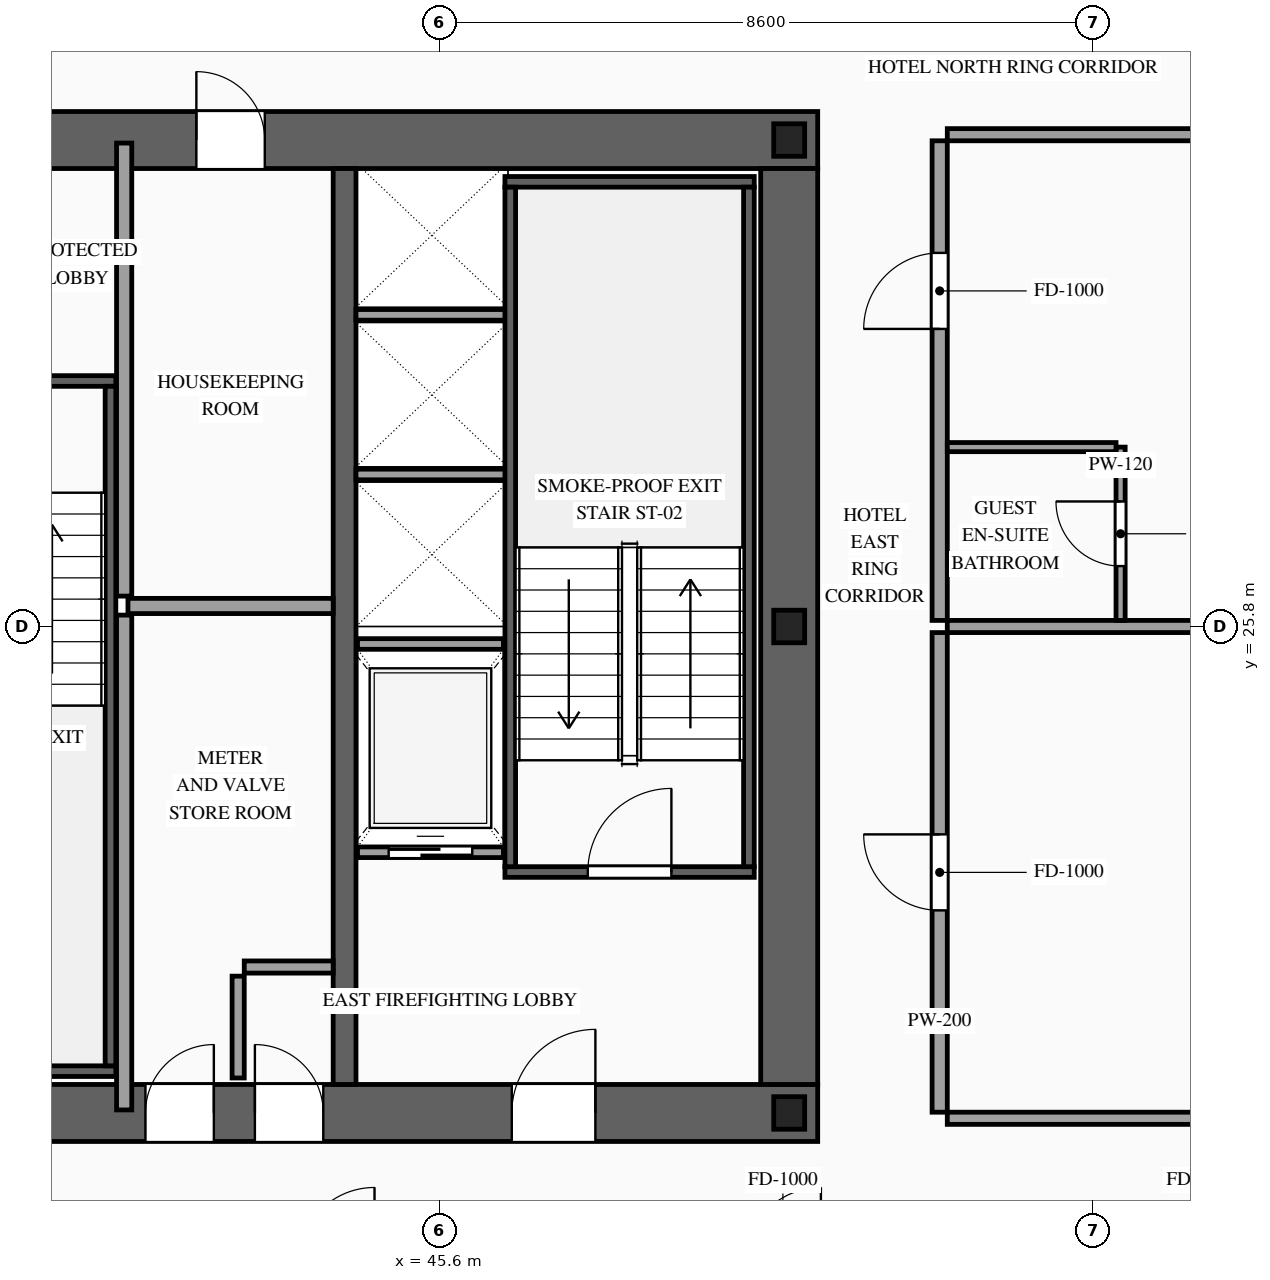
"""IFC4 building model, lengths in metres.
Left out: names, types, materials, properties, quantities, classifications, styles, units other than length and angle.
Written with IfcOpenShell. Run it as: python <this file> out.ifc"""

import sys

from ifc_helpers import new_model, si_unit, direction, frame, frame_2d, origin, origin_2d, place, context, subcontext, project, spatial, rectangle, i_section, extrude, source, transform, mapped, element, fill, save


model = new_model("IFC4")
c1 = context("Model", 3, precision=1e-05, world=origin(), true_north=direction((0.0, 1.0)))
c2 = subcontext(c1, "Body", "Model", "MODEL_VIEW")
j1 = project(units=[si_unit("LENGTHUNIT", "METRE"), si_unit("PLANEANGLEUNIT", "RADIAN")], contexts=[c1])
p1 = place(None, origin())
s1 = spatial("IfcSite", under=j1, at=p1, CompositionType="ELEMENT")
p2 = place(p1, origin())
s2 = spatial("IfcBuilding", under=s1, at=p2, CompositionType="ELEMENT")
p3 = place(p2, frame((0.0, 0.0, 97.4)))
s3 = spatial("IfcBuildingStorey", under=s2, at=p3, CompositionType="ELEMENT", Elevation=97.4)
p4 = place(p3, frame((23.425, 19.4, 0.0), z_axis=(0.0, 0.0, 1.0), x_axis=(1.0, 0.0, 0.0)))
e1 = element("IfcWall", 1, at=p4, inside=s3, PredefinedType="SHEAR", context=c2, shape_type="SweptSolid", body=[
    extrude(rectangle(XDim=27.15, YDim=0.75, at=frame_2d((13.575, 0.0))), origin(), (0.0, 0.0, 1.0), 3.6),
])
p5 = place(p4, frame((2.025, 0.0, 0.0)))
e2 = element("IfcOpeningElement", 2, at=p5, cuts=e1, PredefinedType="OPENING", context=c2, shape_type="SweptSolid", body=[
    extrude(rectangle(XDim=1.1, YDim=2.2, at=frame_2d((0.55, 1.1))), frame((0.0, 0.39, 0.0), z_axis=(0.0, -1.0, 0.0), x_axis=(1.0, 0.0, 0.0)), (0.0, 0.0, 1.0), 0.78),
])
p6 = place(p4, frame((9.925, 0.0, 0.0)))
e3 = element("IfcOpeningElement", 3, at=p6, cuts=e1, PredefinedType="OPENING", context=c2, shape_type="SweptSolid", body=[
    extrude(rectangle(XDim=1.1, YDim=2.2, at=frame_2d((0.55, 1.1))), frame((0.0, 0.39, 0.0), z_axis=(0.0, -1.0, 0.0), x_axis=(1.0, 0.0, 0.0)), (0.0, 0.0, 1.0), 0.78),
])
p7 = place(p4, frame((23.125, 0.0, 0.0)))
e4 = element("IfcOpeningElement", 4, at=p7, cuts=e1, PredefinedType="OPENING", context=c2, shape_type="SweptSolid", body=[
    extrude(rectangle(XDim=1.1, YDim=2.2, at=frame_2d((0.55, 1.1))), frame((0.0, 0.39, 0.0), z_axis=(0.0, -1.0, 0.0), x_axis=(1.0, 0.0, 0.0)), (0.0, 0.0, 1.0), 0.78),
])
p8 = place(p4, frame((19.745, 0.0, 0.0)))
e5 = element("IfcOpeningElement", 5, at=p8, cuts=e1, PredefinedType="OPENING", context=c2, shape_type="SweptSolid", body=[
    extrude(rectangle(XDim=0.9, YDim=2.15, at=frame_2d((0.45, 1.075))), frame((0.0, 0.39, 0.0), z_axis=(0.0, -1.0, 0.0), x_axis=(1.0, 0.0, 0.0)), (0.0, 0.0, 1.0), 0.78),
])
p9 = place(p4, frame((18.305, 0.0, 0.0)))
e6 = element("IfcOpeningElement", 6, at=p9, cuts=e1, PredefinedType="OPENING", context=c2, shape_type="SweptSolid", body=[
    extrude(rectangle(XDim=0.9, YDim=2.15, at=frame_2d((0.45, 1.075))), frame((0.0, 0.39, 0.0), z_axis=(0.0, -1.0, 0.0), x_axis=(1.0, 0.0, 0.0)), (0.0, 0.0, 1.0), 0.78),
])
p10 = place(p3, frame((23.425, 32.2, 0.0), z_axis=(0.0, 0.0, 1.0), x_axis=(1.0, 0.0, 0.0)))
e7 = element("IfcWall", 7, at=p10, inside=s3, PredefinedType="SHEAR", context=c2, shape_type="SweptSolid", body=[
    extrude(rectangle(XDim=27.15, YDim=0.75, at=frame_2d((13.575, 0.0))), origin(), (0.0, 0.0, 1.0), 3.6),
])
p11 = place(p10, frame((4.645, 0.0, 0.0)))
e8 = element("IfcOpeningElement", 8, at=p11, cuts=e7, PredefinedType="OPENING", context=c2, shape_type="SweptSolid", body=[
    extrude(rectangle(XDim=0.9, YDim=2.15, at=frame_2d((0.45, 1.075))), frame((0.0, 0.39, 0.0), z_axis=(0.0, -1.0, 0.0), x_axis=(1.0, 0.0, 0.0)), (0.0, 0.0, 1.0), 0.78),
])
p12 = place(p10, frame((9.925, 0.0, 0.0)))
e9 = element("IfcOpeningElement", 9, at=p12, cuts=e7, PredefinedType="OPENING", context=c2, shape_type="SweptSolid", body=[
    extrude(rectangle(XDim=1.1, YDim=2.2, at=frame_2d((0.55, 1.1))), frame((0.0, 0.39, 0.0), z_axis=(0.0, -1.0, 0.0), x_axis=(1.0, 0.0, 0.0)), (0.0, 0.0, 1.0), 0.78),
])
p13 = place(p10, frame((15.775, 0.0, 0.0)))
e10 = element("IfcOpeningElement", 10, at=p13, cuts=e7, PredefinedType="OPENING", context=c2, shape_type="SweptSolid", body=[
    extrude(rectangle(XDim=1.1, YDim=2.2, at=frame_2d((0.55, 1.1))), frame((0.0, 0.39, 0.0), z_axis=(0.0, -1.0, 0.0), x_axis=(1.0, 0.0, 0.0)), (0.0, 0.0, 1.0), 0.78),
])
p14 = place(p10, frame((18.975, 0.0, 0.0)))
e11 = element("IfcOpeningElement", 11, at=p14, cuts=e7, PredefinedType="OPENING", context=c2, shape_type="SweptSolid", body=[
    extrude(rectangle(XDim=0.9, YDim=2.15, at=frame_2d((0.45, 1.075))), frame((0.0, 0.39, 0.0), z_axis=(0.0, -1.0, 0.0), x_axis=(1.0, 0.0, 0.0)), (0.0, 0.0, 1.0), 0.78),
])
m1 = source(origin(), c2, "Body", "SweptSolid", [
    extrude(rectangle(XDim=12.05, YDim=0.75, at=frame_2d((6.025, 0.0))), origin(), (0.0, 0.0, 1.0), 3.6),
])
p15 = place(p3, frame((50.2, 19.775, 0.0), z_axis=(0.0, 0.0, 1.0), x_axis=(0.0, 1.0, 0.0)))
e12 = element("IfcWall", 12, at=p15, inside=s3, PredefinedType="SHEAR", context=c2, shape_type="MappedRepresentation", body=[
    mapped(m1, transform((0.0, 0.0, 0.0), scale=1.0)),
])
m2 = source(origin(), c2, "Body", "SweptSolid", [
    extrude(rectangle(XDim=12.05, YDim=0.3, at=frame_2d((6.025, 0.0))), origin(), (0.0, 0.0, 1.0), 3.6),
])
p16 = place(p3, frame((44.35, 19.775, 0.0), z_axis=(0.0, 0.0, 1.0), x_axis=(0.0, 1.0, 0.0)))
e13 = element("IfcWall", 13, at=p16, inside=s3, PredefinedType="SOLIDWALL", context=c2, shape_type="MappedRepresentation", body=[
    mapped(m2, transform((0.0, 0.0, 0.0), scale=1.0)),
])
m3 = source(origin(), c2, "Body", "SweptSolid", [
    extrude(i_section(OverallWidth=0.407, OverallDepth=0.428, WebThickness=0.02, FlangeThickness=0.035, at=origin_2d()), origin(), (0.0, 0.0, 1.0), 3.6),
])
for number, where, z_axis, x_axis in (
    (14, (50.2, 19.4, 0.0), (0.0, 0.0, 1.0), (1.0, 0.0, 0.0)),
    (15, (50.2, 25.8, 0.0), (0.0, 0.0, 1.0), (1.0, 0.0, 0.0)),
    (16, (50.2, 32.2, 0.0), (0.0, 0.0, 1.0), (1.0, 0.0, 0.0)),
):
    element("IfcColumn", number, at=place(p3, frame(where, z_axis=z_axis, x_axis=x_axis)), inside=s3, PredefinedType="COLUMN", context=c2, shape_type="MappedRepresentation", body=[
        mapped(m3, transform((0.0, 0.0, 0.0), scale=1.0)),
    ])
p17 = place(p3, frame((44.52, 22.83, 0.0), z_axis=(0.0, 0.0, 1.0), x_axis=(1.0, 0.0, 0.0)))
e17 = element("IfcWall", 17, at=p17, inside=s3, PredefinedType="SOLIDWALL", context=c2, shape_type="SweptSolid", body=[
    extrude(rectangle(XDim=1.92, YDim=0.14, at=frame_2d((0.96, 0.0))), origin(), (0.0, 0.0, 1.0), 3.38),
])
p18 = place(p17, frame((0.41, 0.0, 0.0)))
e18 = element("IfcOpeningElement", 18, at=p18, cuts=e17, PredefinedType="OPENING", context=c2, shape_type="SweptSolid", body=[
    extrude(rectangle(XDim=1.1, YDim=2.2, at=frame_2d((0.55, 1.1))), frame((0.0, 0.085, 0.0), z_axis=(0.0, -1.0, 0.0), x_axis=(1.0, 0.0, 0.0)), (0.0, 0.0, 1.0), 0.17),
])
m4 = source(origin(), c2, "Body", "SweptSolid", [
    extrude(rectangle(XDim=1.92, YDim=0.14, at=frame_2d((0.96, 0.0))), origin(), (0.0, 0.0, 1.0), 3.38),
])
p19 = place(p3, frame((44.52, 25.57, 0.0), z_axis=(0.0, 0.0, 1.0), x_axis=(1.0, 0.0, 0.0)))
e19 = element("IfcWall", 19, at=p19, inside=s3, PredefinedType="SOLIDWALL", context=c2, shape_type="MappedRepresentation", body=[
    mapped(m4, transform((0.0, 0.0, 0.0), scale=1.0)),
])
m5 = source(origin(), c2, "Body", "SweptSolid", [
    extrude(rectangle(XDim=2.0, YDim=0.14, at=frame_2d((1.0, 0.0))), origin(), (0.0, 0.0, 1.0), 3.38),
])
for number, where, z_axis, x_axis in (
    (20, (44.5, 27.8, 0.0), (0.0, 0.0, 1.0), (1.0, 0.0, 0.0)),
    (21, (44.5, 29.9, 0.0), (0.0, 0.0, 1.0), (1.0, 0.0, 0.0)),
):
    element("IfcWall", number, at=place(p3, frame(where, z_axis=z_axis, x_axis=x_axis)), inside=s3, PredefinedType="SOLIDWALL", context=c2, shape_type="MappedRepresentation", body=[
        mapped(m5, transform((0.0, 0.0, 0.0), scale=1.0)),
    ])
p20 = place(p3, frame((46.46, 22.57, 0.0), z_axis=(0.0, 0.0, 1.0), x_axis=(1.0, 0.0, 0.0)))
e22 = element("IfcWall", 22, at=p20, inside=s3, PredefinedType="SOLIDWALL", context=c2, shape_type="SweptSolid", body=[
    extrude(rectangle(XDim=3.28, YDim=0.14, at=frame_2d((1.64, 0.0))), origin(), (0.0, 0.0, 1.0), 3.38),
])
p21 = place(p20, frame((1.09, 0.0, 0.0)))
e23 = element("IfcOpeningElement", 23, at=p21, cuts=e22, PredefinedType="OPENING", context=c2, shape_type="SweptSolid", body=[
    extrude(rectangle(XDim=1.1, YDim=2.2, at=frame_2d((0.55, 1.1))), frame((0.0, 0.085, 0.0), z_axis=(0.0, -1.0, 0.0), x_axis=(1.0, 0.0, 0.0)), (0.0, 0.0, 1.0), 0.17),
])
m6 = source(origin(), c2, "Body", "SweptSolid", [
    extrude(rectangle(XDim=3.28, YDim=0.14, at=frame_2d((1.64, 0.0))), origin(), (0.0, 0.0, 1.0), 3.38),
])
p22 = place(p3, frame((46.46, 31.65, 0.0), z_axis=(0.0, 0.0, 1.0), x_axis=(1.0, 0.0, 0.0)))
e24 = element("IfcWall", 24, at=p22, inside=s3, PredefinedType="SOLIDWALL", context=c2, shape_type="MappedRepresentation", body=[
    mapped(m6, transform((0.0, 0.0, 0.0), scale=1.0)),
])
m7 = source(origin(), c2, "Body", "SweptSolid", [
    extrude(rectangle(XDim=8.94, YDim=0.14, at=frame_2d((4.47, 0.0))), origin(), (0.0, 0.0, 1.0), 3.38),
])
for number, where, z_axis, x_axis in (
    (25, (46.53, 22.64, 0.0), (0.0, 0.0, 1.0), (0.0, 1.0, 0.0)),
    (26, (49.67, 22.64, 0.0), (0.0, 0.0, 1.0), (0.0, 1.0, 0.0)),
):
    element("IfcWall", number, at=place(p3, frame(where, z_axis=z_axis, x_axis=x_axis)), inside=s3, PredefinedType="SOLIDWALL", context=c2, shape_type="MappedRepresentation", body=[
        mapped(m7, transform((0.0, 0.0, 0.0), scale=1.0)),
    ])
p23 = place(p3, frame((38.2, 29.03, 0.0), z_axis=(0.0, 0.0, 1.0), x_axis=(1.0, 0.0, 0.0)))
e27 = element("IfcWall", 27, at=p23, inside=s3, PredefinedType="SOLIDWALL", context=c2, shape_type="SweptSolid", body=[
    extrude(rectangle(XDim=3.14, YDim=0.14, at=frame_2d((1.57, 0.0))), origin(), (0.0, 0.0, 1.0), 3.38),
])
p24 = place(p23, frame((1.02, 0.0, 0.0)))
e28 = element("IfcOpeningElement", 28, at=p24, cuts=e27, PredefinedType="OPENING", context=c2, shape_type="SweptSolid", body=[
    extrude(rectangle(XDim=1.1, YDim=2.2, at=frame_2d((0.55, 1.1))), frame((0.0, 0.085, 0.0), z_axis=(0.0, -1.0, 0.0), x_axis=(1.0, 0.0, 0.0)), (0.0, 0.0, 1.0), 0.17),
])
m8 = source(origin(), c2, "Body", "SweptSolid", [
    extrude(rectangle(XDim=3.14, YDim=0.14, at=frame_2d((1.57, 0.0))), origin(), (0.0, 0.0, 1.0), 3.38),
])
p25 = place(p3, frame((38.2, 19.95, 0.0), z_axis=(0.0, 0.0, 1.0), x_axis=(1.0, 0.0, 0.0)))
e29 = element("IfcWall", 29, at=p25, inside=s3, PredefinedType="SOLIDWALL", context=c2, shape_type="MappedRepresentation", body=[
    mapped(m8, transform((0.0, 0.0, 0.0), scale=1.0)),
])
m9 = source(origin(), c2, "Body", "SweptSolid", [
    extrude(rectangle(XDim=8.94, YDim=0.14, at=frame_2d((4.47, 0.0))), origin(), (0.0, 0.0, 1.0), 3.38),
])
p26 = place(p3, frame((41.27, 20.02, 0.0), z_axis=(0.0, 0.0, 1.0), x_axis=(0.0, 1.0, 0.0)))
e30 = element("IfcWall", 30, at=p26, inside=s3, PredefinedType="SOLIDWALL", context=c2, shape_type="MappedRepresentation", body=[
    mapped(m9, transform((0.0, 0.0, 0.0), scale=1.0)),
])
m10 = source(origin(), c2, "Body", "SweptSolid", [
    extrude(rectangle(XDim=1.34, YDim=0.16, at=frame_2d((0.67, 0.0))), origin(), (0.0, 0.0, 1.0), 3.38),
])
p27 = place(p3, frame((42.95, 19.86, 0.0), z_axis=(0.0, 0.0, 1.0), x_axis=(0.0, 1.0, 0.0)))
e31 = element("IfcWall", 31, at=p27, inside=s3, PredefinedType="PARTITIONING", context=c2, shape_type="MappedRepresentation", body=[
    mapped(m10, transform((0.0, 0.0, 0.0), scale=1.0)),
])
m11 = source(origin(), c2, "Body", "SweptSolid", [
    extrude(rectangle(XDim=1.17, YDim=0.16, at=frame_2d((0.585, 0.0))), origin(), (0.0, 0.0, 1.0), 3.38),
])
p28 = place(p3, frame((43.03, 21.32, 0.0), z_axis=(0.0, 0.0, 1.0), x_axis=(1.0, 0.0, 0.0)))
e32 = element("IfcWall", 32, at=p28, inside=s3, PredefinedType="PARTITIONING", context=c2, shape_type="MappedRepresentation", body=[
    mapped(m11, transform((0.0, 0.0, 0.0), scale=1.0)),
])
m12 = source(origin(), c2, "Body", "SweptSolid", [
    extrude(rectangle(XDim=6.51, YDim=0.2, at=frame_2d((3.255, 0.0))), origin(), (0.0, 0.0, 1.0), 3.38),
])
p29 = place(p3, frame((41.45, 19.44, 0.0), z_axis=(0.0, 0.0, 1.0), x_axis=(0.0, 1.0, 0.0)))
e33 = element("IfcWall", 33, at=p29, inside=s3, PredefinedType="PARTITIONING", context=c2, shape_type="MappedRepresentation", body=[
    mapped(m12, transform((0.0, 0.0, 0.0), scale=1.0)),
])
m13 = source(origin(), c2, "Body", "SweptSolid", [
    extrude(rectangle(XDim=2.7, YDim=0.2, at=frame_2d((1.35, 0.0))), origin(), (0.0, 0.0, 1.0), 3.38),
])
p30 = place(p3, frame((41.5, 26.07, 0.0), z_axis=(0.0, 0.0, 1.0), x_axis=(1.0, 0.0, 0.0)))
e34 = element("IfcWall", 34, at=p30, inside=s3, PredefinedType="PARTITIONING", context=c2, shape_type="MappedRepresentation", body=[
    mapped(m13, transform((0.0, 0.0, 0.0), scale=1.0)),
])
m14 = source(origin(), c2, "Body", "SweptSolid", [
    extrude(rectangle(XDim=5.96, YDim=0.2, at=frame_2d((2.98, 0.0))), origin(), (0.0, 0.0, 1.0), 3.38),
])
p31 = place(p3, frame((41.45, 26.2, 0.0), z_axis=(0.0, 0.0, 1.0), x_axis=(0.0, 1.0, 0.0)))
e35 = element("IfcWall", 35, at=p31, inside=s3, PredefinedType="PARTITIONING", context=c2, shape_type="MappedRepresentation", body=[
    mapped(m14, transform((0.0, 0.0, 0.0), scale=1.0)),
])
p32 = place(p3, frame((52.18, 19.41, 0.0), z_axis=(0.0, 0.0, 1.0), x_axis=(0.0, 1.0, 0.0)))
e36 = element("IfcWall", 36, at=p32, inside=s3, PredefinedType="PARTITIONING", context=c2, shape_type="SweptSolid", body=[
    extrude(rectangle(XDim=6.31, YDim=0.2, at=frame_2d((3.155, 0.0))), origin(), (0.0, 0.0, 1.0), 3.38),
])
p33 = place(p32, frame((2.655, 0.0, 0.0)))
e37 = element("IfcOpeningElement", 37, at=p33, cuts=e36, PredefinedType="OPENING", context=c2, shape_type="SweptSolid", body=[
    extrude(rectangle(XDim=1.0, YDim=2.2, at=frame_2d((0.5, 1.1))), frame((0.0, 0.115, 0.0), z_axis=(0.0, -1.0, 0.0), x_axis=(1.0, 0.0, 0.0)), (0.0, 0.0, 1.0), 0.23),
])
m15 = source(origin(), c2, "Body", "SweptSolid", [
    extrude(rectangle(XDim=8.17, YDim=0.16, at=frame_2d((4.085, 0.0))), origin(), (0.0, 0.0, 1.0), 2.675),
])
p34 = place(p3, frame((52.28, 25.8, 0.0), z_axis=(0.0, 0.0, 1.0), x_axis=(1.0, 0.0, 0.0)))
e38 = element("IfcWall", 38, at=p34, inside=s3, PredefinedType="PARTITIONING", context=c2, shape_type="MappedRepresentation", body=[
    mapped(m15, transform((0.0, 0.0, 0.0), scale=1.0)),
])
m16 = source(origin(), c2, "Body", "SweptSolid", [
    extrude(rectangle(XDim=8.17, YDim=0.16, at=frame_2d((4.085, 0.0))), origin(), (0.0, 0.0, 1.0), 2.875),
])
p35 = place(p3, frame((52.28, 19.33, 0.0), z_axis=(0.0, 0.0, 1.0), x_axis=(1.0, 0.0, 0.0)))
e39 = element("IfcWall", 39, at=p35, inside=s3, PredefinedType="PARTITIONING", context=c2, shape_type="MappedRepresentation", body=[
    mapped(m16, transform((0.0, 0.0, 0.0), scale=1.0)),
])
p36 = place(p3, frame((52.18, 25.88, 0.0), z_axis=(0.0, 0.0, 1.0), x_axis=(0.0, 1.0, 0.0)))
e40 = element("IfcWall", 40, at=p36, inside=s3, PredefinedType="PARTITIONING", context=c2, shape_type="SweptSolid", body=[
    extrude(rectangle(XDim=6.31, YDim=0.2, at=frame_2d((3.155, 0.0))), origin(), (0.0, 0.0, 1.0), 3.38),
])
p37 = place(p36, frame((3.835, 0.0, 0.0)))
e41 = element("IfcOpeningElement", 41, at=p37, cuts=e40, PredefinedType="OPENING", context=c2, shape_type="SweptSolid", body=[
    extrude(rectangle(XDim=1.0, YDim=2.2, at=frame_2d((0.5, 1.1))), frame((0.0, 0.115, 0.0), z_axis=(0.0, -1.0, 0.0), x_axis=(1.0, 0.0, 0.0)), (0.0, 0.0, 1.0), 0.23),
])
p38 = place(p3, frame((52.28, 32.27, 0.0), z_axis=(0.0, 0.0, 1.0), x_axis=(1.0, 0.0, 0.0)))
e42 = element("IfcWall", 42, at=p38, inside=s3, PredefinedType="PARTITIONING", context=c2, shape_type="MappedRepresentation", body=[
    mapped(m16, transform((0.0, 0.0, 0.0), scale=1.0)),
])
p39 = place(p3, frame((54.56, 25.88, 0.0), z_axis=(0.0, 0.0, 1.0), x_axis=(0.0, 1.0, 0.0)))
e43 = element("IfcWall", 43, at=p39, inside=s3, PredefinedType="PARTITIONING", context=c2, shape_type="SweptSolid", body=[
    extrude(rectangle(XDim=2.28, YDim=0.12, at=frame_2d((1.14, 0.0))), origin(), (0.0, 0.0, 1.0), 3.38),
])
p40 = place(p39, frame((0.715, 0.0, 0.0)))
e44 = element("IfcOpeningElement", 44, at=p40, cuts=e43, PredefinedType="OPENING", context=c2, shape_type="SweptSolid", body=[
    extrude(rectangle(XDim=0.85, YDim=2.1, at=frame_2d((0.425, 1.05))), frame((0.0, 0.075, 0.0), z_axis=(0.0, -1.0, 0.0), x_axis=(1.0, 0.0, 0.0)), (0.0, 0.0, 1.0), 0.15),
])
m17 = source(origin(), c2, "Body", "SweptSolid", [
    extrude(rectangle(XDim=2.22, YDim=0.12, at=frame_2d((1.11, 0.0))), origin(), (0.0, 0.0, 1.0), 3.38),
])
p41 = place(p3, frame((52.28, 28.16, 0.0), z_axis=(0.0, 0.0, 1.0), x_axis=(1.0, 0.0, 0.0)))
e45 = element("IfcWall", 45, at=p41, inside=s3, PredefinedType="PARTITIONING", context=c2, shape_type="MappedRepresentation", body=[
    mapped(m17, transform((0.0, 0.0, 0.0), scale=1.0)),
])
m18 = source(origin(), c2, "Body", "SweptSolid", [
    extrude(rectangle(XDim=1.1, YDim=2.2, at=frame_2d((0.55, 1.1))), frame((0.0, 0.025, 0.0), z_axis=(0.0, -1.0, 0.0), x_axis=(1.0, 0.0, 0.0)), (0.0, 0.0, 1.0), 0.05),
])
p42 = place(p18, origin())
e46 = element("IfcDoor", 46, at=p42, inside=s3, OperationType="SLIDING_TO_RIGHT", PredefinedType="DOOR", context=c2, shape_type="MappedRepresentation", body=[
    mapped(m18, transform((0.0, 0.0, 0.0), scale=1.0)),
])
fill(e18, e46)
m19 = source(origin(), c2, "Body", "SweptSolid", [
    extrude(rectangle(XDim=1.1, YDim=2.2, at=frame_2d((0.55, 1.1))), frame((0.0, 0.025, 0.0), z_axis=(0.0, -1.0, 0.0), x_axis=(1.0, 0.0, 0.0)), (0.0, 0.0, 1.0), 0.05),
])
p43 = place(p21, origin())
e47 = element("IfcDoor", 47, at=p43, inside=s3, OperationType="SINGLE_SWING_RIGHT", PredefinedType="DOOR", context=c2, shape_type="MappedRepresentation", body=[
    mapped(m19, transform((0.0, 0.0, 0.0), scale=1.0)),
])
fill(e23, e47)
p44 = place(p7, origin())
e48 = element("IfcDoor", 48, at=p44, inside=s3, OperationType="SINGLE_SWING_RIGHT", PredefinedType="DOOR", context=c2, shape_type="MappedRepresentation", body=[
    mapped(m19, transform((0.0, 0.0, 0.0), scale=1.0)),
])
fill(e4, e48)
m20 = source(origin(), c2, "Body", "SweptSolid", [
    extrude(rectangle(XDim=0.9, YDim=2.15, at=frame_2d((0.45, 1.075))), frame((0.0, 0.025, 0.0), z_axis=(0.0, -1.0, 0.0), x_axis=(1.0, 0.0, 0.0)), (0.0, 0.0, 1.0), 0.05),
])
p45 = place(p8, origin())
e49 = element("IfcDoor", 49, at=p45, inside=s3, OperationType="SINGLE_SWING_LEFT", PredefinedType="DOOR", context=c2, shape_type="MappedRepresentation", body=[
    mapped(m20, transform((0.0, 0.0, 0.0), scale=1.0)),
])
fill(e5, e49)
p46 = place(p9, origin())
e50 = element("IfcDoor", 50, at=p46, inside=s3, OperationType="SINGLE_SWING_RIGHT", PredefinedType="DOOR", context=c2, shape_type="MappedRepresentation", body=[
    mapped(m20, transform((0.0, 0.0, 0.0), scale=1.0)),
])
fill(e6, e50)
p47 = place(p14, origin())
e51 = element("IfcDoor", 51, at=p47, inside=s3, OperationType="SINGLE_SWING_LEFT", PredefinedType="DOOR", context=c2, shape_type="MappedRepresentation", body=[
    mapped(m20, transform((0.0, 0.0, 0.0), scale=1.0)),
])
fill(e11, e51)
m21 = source(origin(), c2, "Body", "SweptSolid", [
    extrude(rectangle(XDim=1.0, YDim=2.2, at=frame_2d((0.5, 1.1))), frame((0.0, 0.025, 0.0), z_axis=(0.0, -1.0, 0.0), x_axis=(1.0, 0.0, 0.0)), (0.0, 0.0, 1.0), 0.05),
])
p48 = place(p33, origin())
e52 = element("IfcDoor", 52, at=p48, inside=s3, OperationType="SINGLE_SWING_RIGHT", PredefinedType="DOOR", context=c2, shape_type="MappedRepresentation", body=[
    mapped(m21, transform((0.0, 0.0, 0.0), scale=1.0)),
])
fill(e37, e52)
p49 = place(p37, origin())
e53 = element("IfcDoor", 53, at=p49, inside=s3, OperationType="SINGLE_SWING_LEFT", PredefinedType="DOOR", context=c2, shape_type="MappedRepresentation", body=[
    mapped(m21, transform((0.0, 0.0, 0.0), scale=1.0)),
])
fill(e41, e53)
m22 = source(origin(), c2, "Body", "SweptSolid", [
    extrude(rectangle(XDim=0.85, YDim=2.1, at=frame_2d((0.425, 1.05))), frame((0.0, 0.025, 0.0), z_axis=(0.0, -1.0, 0.0), x_axis=(1.0, 0.0, 0.0)), (0.0, 0.0, 1.0), 0.05),
])
p50 = place(p40, origin())
e54 = element("IfcDoor", 54, at=p50, inside=s3, OperationType="SINGLE_SWING_RIGHT", PredefinedType="DOOR", context=c2, shape_type="MappedRepresentation", body=[
    mapped(m22, transform((0.0, 0.0, 0.0), scale=1.0)),
])
fill(e44, e54)
save(model, sys.argv[1])
